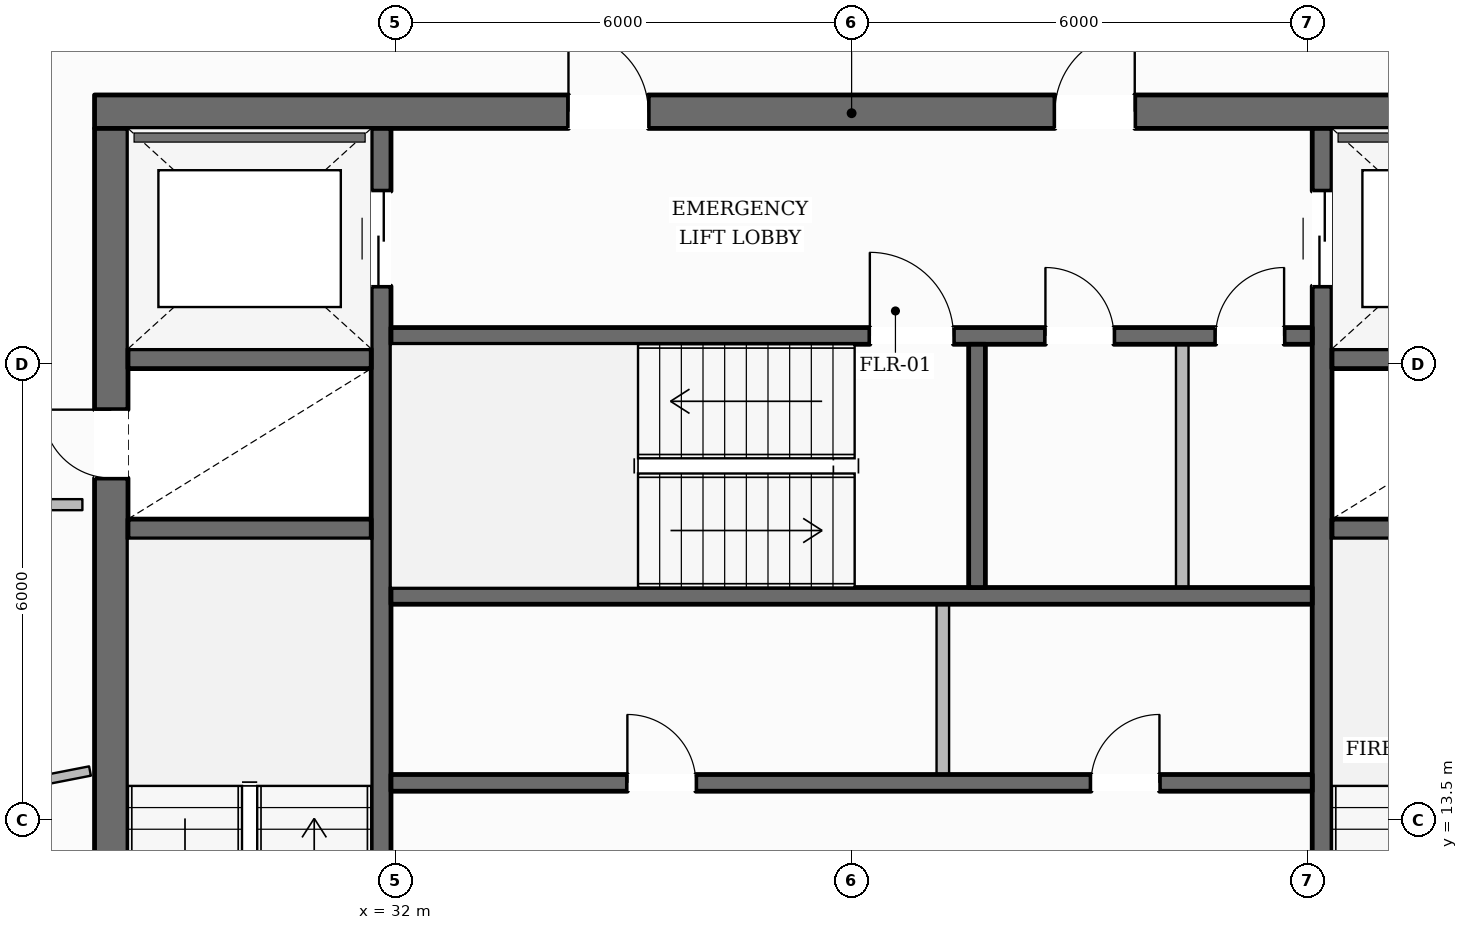
"""IFC4 building model, lengths in metres.
Left out: names, types, materials, properties, quantities, classifications, styles, units other than length and angle.
Written with IfcOpenShell. Run it as: python <this file> out.ifc"""

import sys

from ifc_helpers import new_model, si_unit, direction, frame, frame_2d, origin, place, context, subcontext, project, spatial, rectangle, extrude, element, fill, save


model = new_model("IFC4")
c1 = context("Model", 3, precision=1e-05, world=origin(), true_north=direction((0.0, 1.0)))
c2 = subcontext(c1, "Body", "Model", "MODEL_VIEW")
j1 = project(units=[si_unit("LENGTHUNIT", "METRE"), si_unit("PLANEANGLEUNIT", "RADIAN")], contexts=[c1])
p1 = place(None, origin())
s1 = spatial("IfcSite", under=j1, at=p1, CompositionType="ELEMENT")
p2 = place(p1, origin())
s2 = spatial("IfcBuilding", under=s1, at=p2, CompositionType="ELEMENT")
p3 = place(p2, frame((0.0, 0.0, 199.65)))
s3 = spatial("IfcBuildingStorey", under=s2, at=p3, CompositionType="ELEMENT", Elevation=199.65)
p4 = place(p3, frame((28.04, 22.82, 0.0), z_axis=(0.0, 0.0, 1.0), x_axis=(1.0, 0.0, 0.0)))
e1 = element("IfcWall", 1, at=p4, inside=s3, PredefinedType="SOLIDWALL", context=c2, shape_type="SweptSolid", body=[
    extrude(rectangle(XDim=19.92, YDim=0.44, at=frame_2d((9.96, 0.0))), origin(), (0.0, 0.0, 1.0), 3.6),
])
p5 = place(p4, frame((6.235, 0.0, 0.0)))
e2 = element("IfcOpeningElement", 2, at=p5, cuts=e1, PredefinedType="OPENING", context=c2, shape_type="SweptSolid", body=[
    extrude(rectangle(XDim=1.05, YDim=2.15, at=frame_2d((0.525, 1.075))), frame((0.0, 0.23, 0.0), z_axis=(0.0, -1.0, 0.0), x_axis=(1.0, 0.0, 0.0)), (0.0, 0.0, 1.0), 0.46),
])
p6 = place(p4, frame((12.635, 0.0, 0.0)))
e3 = element("IfcOpeningElement", 3, at=p6, cuts=e1, PredefinedType="OPENING", context=c2, shape_type="SweptSolid", body=[
    extrude(rectangle(XDim=1.05, YDim=2.15, at=frame_2d((0.525, 1.075))), frame((0.0, 0.23, 0.0), z_axis=(0.0, -1.0, 0.0), x_axis=(1.0, 0.0, 0.0)), (0.0, 0.0, 1.0), 0.46),
])
p7 = place(p3, frame((28.26, 9.6, 0.0), z_axis=(0.0, 0.0, 1.0), x_axis=(0.0, 1.0, 0.0)))
e4 = element("IfcWall", 4, at=p7, inside=s3, PredefinedType="SOLIDWALL", context=c2, shape_type="SweptSolid", body=[
    extrude(rectangle(XDim=13.0, YDim=0.44, at=frame_2d((6.5, 0.0))), origin(), (0.0, 0.0, 1.0), 3.6),
])
p8 = place(p7, frame((0.2, 0.0, 0.0)))
e5 = element("IfcOpeningElement", 5, at=p8, cuts=e4, PredefinedType="OPENING", context=c2, shape_type="SweptSolid", body=[
    extrude(rectangle(XDim=1.1, YDim=2.15, at=frame_2d((0.55, 1.075))), frame((0.0, 0.23, 0.0), z_axis=(0.0, -1.0, 0.0), x_axis=(1.0, 0.0, 0.0)), (0.0, 0.0, 1.0), 0.46),
])
p9 = place(p7, frame((8.4, 0.0, 0.0)))
e6 = element("IfcOpeningElement", 6, at=p9, cuts=e4, PredefinedType="OPENING", context=c2, shape_type="SweptSolid", body=[
    extrude(rectangle(XDim=0.9, YDim=2.1, at=frame_2d((0.45, 1.05))), frame((0.0, 0.23, 0.0), z_axis=(0.0, -1.0, 0.0), x_axis=(1.0, 0.0, 0.0)), (0.0, 0.0, 1.0), 0.46),
])
p10 = place(p3, frame((31.81, 9.6, 0.0), z_axis=(0.0, 0.0, 1.0), x_axis=(0.0, 1.0, 0.0)))
e7 = element("IfcWall", 7, at=p10, inside=s3, PredefinedType="SHEAR", context=c2, shape_type="SweptSolid", body=[
    extrude(rectangle(XDim=13.0, YDim=0.26, at=frame_2d((6.5, 0.0))), origin(), (0.0, 0.0, 1.0), 3.6),
])
p11 = place(p10, frame((10.925, 0.0, 0.0)))
e8 = element("IfcOpeningElement", 8, at=p11, cuts=e7, PredefinedType="OPENING", context=c2, shape_type="SweptSolid", body=[
    extrude(rectangle(XDim=1.25, YDim=2.25, at=frame_2d((0.625, 1.125))), frame((0.0, 0.14, 0.0), z_axis=(0.0, -1.0, 0.0), x_axis=(1.0, 0.0, 0.0)), (0.0, 0.0, 1.0), 0.28),
])
p12 = place(p3, frame((44.19, 9.6, 0.0), z_axis=(0.0, 0.0, 1.0), x_axis=(0.0, 1.0, 0.0)))
e9 = element("IfcWall", 9, at=p12, inside=s3, PredefinedType="SHEAR", context=c2, shape_type="SweptSolid", body=[
    extrude(rectangle(XDim=13.0, YDim=0.26, at=frame_2d((6.5, 0.0))), origin(), (0.0, 0.0, 1.0), 3.6),
])
p13 = place(p12, frame((10.925, 0.0, 0.0)))
e10 = element("IfcOpeningElement", 10, at=p13, cuts=e9, PredefinedType="OPENING", context=c2, shape_type="SweptSolid", body=[
    extrude(rectangle(XDim=1.25, YDim=2.25, at=frame_2d((0.625, 1.125))), frame((0.0, 0.14, 0.0), z_axis=(0.0, -1.0, 0.0), x_axis=(1.0, 0.0, 0.0)), (0.0, 0.0, 1.0), 0.28),
])
for number, where, z_axis, x_axis in (
    (11, (28.48, 17.33, 0.0), (0.0, 0.0, 1.0), (1.0, 0.0, 0.0)),
    (12, (28.48, 19.57, 0.0), (0.0, 0.0, 1.0), (1.0, 0.0, 0.0)),
    (13, (44.32, 17.33, 0.0), (0.0, 0.0, 1.0), (1.0, 0.0, 0.0)),
    (14, (44.32, 19.57, 0.0), (0.0, 0.0, 1.0), (1.0, 0.0, 0.0)),
):
    element("IfcWall", number, at=place(p3, frame(where, z_axis=z_axis, x_axis=x_axis)), inside=s3, PredefinedType="SHEAR", context=c2, shape_type="SweptSolid", body=[
        extrude(rectangle(XDim=3.2, YDim=0.26, at=frame_2d((1.6, 0.0))), origin(), (0.0, 0.0, 1.0), 3.6),
    ])
p14 = place(p3, frame((31.94, 19.87, 0.0), z_axis=(0.0, 0.0, 1.0), x_axis=(1.0, 0.0, 0.0)))
e15 = element("IfcWall", 15, at=p14, inside=s3, PredefinedType="SOLIDWALL", context=c2, shape_type="SweptSolid", body=[
    extrude(rectangle(XDim=12.12, YDim=0.22, at=frame_2d((6.06, 0.0))), origin(), (0.0, 0.0, 1.0), 3.6),
])
p15 = place(p14, frame((6.3, 0.0, 0.0)))
e16 = element("IfcOpeningElement", 16, at=p15, cuts=e15, PredefinedType="OPENING", context=c2, shape_type="SweptSolid", body=[
    extrude(rectangle(XDim=1.1, YDim=2.15, at=frame_2d((0.55, 1.075))), frame((0.0, 0.12, 0.0), z_axis=(0.0, -1.0, 0.0), x_axis=(1.0, 0.0, 0.0)), (0.0, 0.0, 1.0), 0.24),
])
p16 = place(p14, frame((8.61, 0.0, 0.0)))
e17 = element("IfcOpeningElement", 17, at=p16, cuts=e15, PredefinedType="OPENING", context=c2, shape_type="SweptSolid", body=[
    extrude(rectangle(XDim=0.9, YDim=2.1, at=frame_2d((0.45, 1.05))), frame((0.0, 0.12, 0.0), z_axis=(0.0, -1.0, 0.0), x_axis=(1.0, 0.0, 0.0)), (0.0, 0.0, 1.0), 0.24),
])
p17 = place(p14, frame((10.85, 0.0, 0.0)))
e18 = element("IfcOpeningElement", 18, at=p17, cuts=e15, PredefinedType="OPENING", context=c2, shape_type="SweptSolid", body=[
    extrude(rectangle(XDim=0.9, YDim=2.1, at=frame_2d((0.45, 1.05))), frame((0.0, 0.12, 0.0), z_axis=(0.0, -1.0, 0.0), x_axis=(1.0, 0.0, 0.0)), (0.0, 0.0, 1.0), 0.24),
])
p18 = place(p3, frame((31.94, 16.45, 0.0), z_axis=(0.0, 0.0, 1.0), x_axis=(1.0, 0.0, 0.0)))
e19 = element("IfcWall", 19, at=p18, inside=s3, PredefinedType="SOLIDWALL", context=c2, shape_type="SweptSolid", body=[
    extrude(rectangle(XDim=12.12, YDim=0.22, at=frame_2d((6.06, 0.0))), origin(), (0.0, 0.0, 1.0), 3.6),
])
p19 = place(p3, frame((39.65, 16.56, 0.0), z_axis=(0.0, 0.0, 1.0), x_axis=(0.0, 1.0, 0.0)))
e20 = element("IfcWall", 20, at=p19, inside=s3, PredefinedType="SOLIDWALL", context=c2, shape_type="SweptSolid", body=[
    extrude(rectangle(XDim=3.2, YDim=0.22, at=frame_2d((1.6, 0.0))), origin(), (0.0, 0.0, 1.0), 3.6),
])
p20 = place(p3, frame((31.94, 13.99, 0.0), z_axis=(0.0, 0.0, 1.0), x_axis=(1.0, 0.0, 0.0)))
e21 = element("IfcWall", 21, at=p20, inside=s3, PredefinedType="SOLIDWALL", context=c2, shape_type="SweptSolid", body=[
    extrude(rectangle(XDim=12.12, YDim=0.22, at=frame_2d((6.06, 0.0))), origin(), (0.0, 0.0, 1.0), 3.6),
])
p21 = place(p20, frame((3.11, 0.0, 0.0)))
e22 = element("IfcOpeningElement", 22, at=p21, cuts=e21, PredefinedType="OPENING", context=c2, shape_type="SweptSolid", body=[
    extrude(rectangle(XDim=0.9, YDim=2.1, at=frame_2d((0.45, 1.05))), frame((0.0, 0.12, 0.0), z_axis=(0.0, -1.0, 0.0), x_axis=(1.0, 0.0, 0.0)), (0.0, 0.0, 1.0), 0.24),
])
p22 = place(p20, frame((9.21, 0.0, 0.0)))
e23 = element("IfcOpeningElement", 23, at=p22, cuts=e21, PredefinedType="OPENING", context=c2, shape_type="SweptSolid", body=[
    extrude(rectangle(XDim=0.9, YDim=2.1, at=frame_2d((0.45, 1.05))), frame((0.0, 0.12, 0.0), z_axis=(0.0, -1.0, 0.0), x_axis=(1.0, 0.0, 0.0)), (0.0, 0.0, 1.0), 0.24),
])
p23 = place(p3, frame((14.586, 11.347, 0.0), z_axis=(0.0, 0.0, 1.0), x_axis=(0.504997770855, 0.863120647089, 0.0)))
e24 = element("IfcWall", 24, at=p23, inside=s3, PredefinedType="STANDARD", context=c2, shape_type="SweptSolid", body=[
    extrude(rectangle(XDim=37.843, YDim=0.35, at=frame_2d((18.921, 0.0))), origin(), (0.0, 0.0, 1.0), 3.132),
])
p24 = place(p23, frame((9.061, 0.0, 0.0)))
e25 = element("IfcOpeningElement", 25, at=p24, cuts=e24, PredefinedType="OPENING", context=c2, shape_type="SweptSolid", body=[
    extrude(rectangle(XDim=1.0, YDim=2.2, at=frame_2d((0.5, 1.1))), frame((0.0, 0.185, 0.0), z_axis=(0.0, -1.0, 0.0), x_axis=(1.0, 0.0, 0.0)), (0.0, 0.0, 1.0), 0.37),
])
p25 = place(p23, frame((33.567, 0.0, 0.65)))
e26 = element("IfcOpeningElement", 26, at=p25, cuts=e24, PredefinedType="OPENING", context=c2, shape_type="SweptSolid", body=[
    extrude(rectangle(XDim=1.45, YDim=1.75, at=frame_2d((0.725, 0.875))), frame((0.0, 0.185, 0.0), z_axis=(0.0, -1.0, 0.0), x_axis=(1.0, 0.0, 0.0)), (0.0, 0.0, 1.0), 0.37),
])
p26 = place(p23, frame((27.42, 0.0, 0.65)))
e27 = element("IfcOpeningElement", 27, at=p26, cuts=e24, PredefinedType="OPENING", context=c2, shape_type="SweptSolid", body=[
    extrude(rectangle(XDim=1.45, YDim=1.75, at=frame_2d((0.725, 0.875))), frame((0.0, 0.185, 0.0), z_axis=(0.0, -1.0, 0.0), x_axis=(1.0, 0.0, 0.0)), (0.0, 0.0, 1.0), 0.37),
])
p27 = place(p23, frame((21.273, 0.0, 0.65)))
e28 = element("IfcOpeningElement", 28, at=p27, cuts=e24, PredefinedType="OPENING", context=c2, shape_type="SweptSolid", body=[
    extrude(rectangle(XDim=1.45, YDim=1.75, at=frame_2d((0.725, 0.875))), frame((0.0, 0.185, 0.0), z_axis=(0.0, -1.0, 0.0), x_axis=(1.0, 0.0, 0.0)), (0.0, 0.0, 1.0), 0.37),
])
p28 = place(p23, frame((2.831, 0.0, 0.65)))
e29 = element("IfcOpeningElement", 29, at=p28, cuts=e24, PredefinedType="OPENING", context=c2, shape_type="SweptSolid", body=[
    extrude(rectangle(XDim=1.45, YDim=1.75, at=frame_2d((0.725, 0.875))), frame((0.0, 0.185, 0.0), z_axis=(0.0, -1.0, 0.0), x_axis=(1.0, 0.0, 0.0)), (0.0, 0.0, 1.0), 0.37),
])
p29 = place(p3, frame((42.36, 43.976, 0.0), z_axis=(0.0, 0.0, 1.0), x_axis=(0.508076618563, -0.861311877121, 0.0)))
e30 = element("IfcWall", 30, at=p29, inside=s3, PredefinedType="STANDARD", context=c2, shape_type="SweptSolid", body=[
    extrude(rectangle(XDim=38.079, YDim=0.35, at=frame_2d((19.04, 0.0))), origin(), (0.0, 0.0, 1.0), 3.132),
])
p30 = place(p29, frame((9.12, 0.0, 0.0)))
e31 = element("IfcOpeningElement", 31, at=p30, cuts=e30, PredefinedType="OPENING", context=c2, shape_type="SweptSolid", body=[
    extrude(rectangle(XDim=1.0, YDim=2.2, at=frame_2d((0.5, 1.1))), frame((0.0, 0.185, 0.0), z_axis=(0.0, -1.0, 0.0), x_axis=(1.0, 0.0, 0.0)), (0.0, 0.0, 1.0), 0.37),
])
p31 = place(p29, frame((33.779, 0.0, 0.65)))
e32 = element("IfcOpeningElement", 32, at=p31, cuts=e30, PredefinedType="OPENING", context=c2, shape_type="SweptSolid", body=[
    extrude(rectangle(XDim=1.45, YDim=1.75, at=frame_2d((0.725, 0.875))), frame((0.0, 0.185, 0.0), z_axis=(0.0, -1.0, 0.0), x_axis=(1.0, 0.0, 0.0)), (0.0, 0.0, 1.0), 0.37),
])
p32 = place(p29, frame((27.591, 0.0, 0.65)))
e33 = element("IfcOpeningElement", 33, at=p32, cuts=e30, PredefinedType="OPENING", context=c2, shape_type="SweptSolid", body=[
    extrude(rectangle(XDim=1.45, YDim=1.75, at=frame_2d((0.725, 0.875))), frame((0.0, 0.185, 0.0), z_axis=(0.0, -1.0, 0.0), x_axis=(1.0, 0.0, 0.0)), (0.0, 0.0, 1.0), 0.37),
])
p33 = place(p29, frame((21.404, 0.0, 0.65)))
e34 = element("IfcOpeningElement", 34, at=p33, cuts=e30, PredefinedType="OPENING", context=c2, shape_type="SweptSolid", body=[
    extrude(rectangle(XDim=1.45, YDim=1.75, at=frame_2d((0.725, 0.875))), frame((0.0, 0.185, 0.0), z_axis=(0.0, -1.0, 0.0), x_axis=(1.0, 0.0, 0.0)), (0.0, 0.0, 1.0), 0.37),
])
p34 = place(p29, frame((2.842, 0.0, 0.65)))
e35 = element("IfcOpeningElement", 35, at=p34, cuts=e30, PredefinedType="OPENING", context=c2, shape_type="SweptSolid", body=[
    extrude(rectangle(XDim=1.45, YDim=1.75, at=frame_2d((0.725, 0.875))), frame((0.0, 0.185, 0.0), z_axis=(0.0, -1.0, 0.0), x_axis=(1.0, 0.0, 0.0)), (0.0, 0.0, 1.0), 0.37),
])
p35 = place(p3, frame((39.2, 14.1, 0.0), z_axis=(0.0, 0.0, 1.0), x_axis=(0.0, 1.0, 0.0)))
e36 = element("IfcWall", 36, at=p35, inside=s3, PredefinedType="PARTITIONING", context=c2, shape_type="SweptSolid", body=[
    extrude(rectangle(XDim=2.24, YDim=0.165, at=frame_2d((1.12, 0.0))), origin(), (0.0, 0.0, 1.0), 3.6),
])
p36 = place(p3, frame((42.35, 16.56, 0.0), z_axis=(0.0, 0.0, 1.0), x_axis=(0.0, 1.0, 0.0)))
e37 = element("IfcWall", 37, at=p36, inside=s3, PredefinedType="PARTITIONING", context=c2, shape_type="SweptSolid", body=[
    extrude(rectangle(XDim=3.2, YDim=0.165, at=frame_2d((1.6, 0.0))), origin(), (0.0, 0.0, 1.0), 3.6),
])
p37 = place(p3, frame((27.88, 17.65, 0.0), z_axis=(0.0, 0.0, 1.0), x_axis=(-1.0, 0.0, 0.0)))
e38 = element("IfcWall", 38, at=p37, inside=s3, PredefinedType="PARTITIONING", context=c2, shape_type="SweptSolid", body=[
    extrude(rectangle(XDim=1.82, YDim=0.145, at=frame_2d((0.91, 0.0))), origin(), (0.0, 0.0, 1.0), 3.6),
])
p38 = place(p3, frame((27.98, 14.146, 0.0), z_axis=(0.0, 0.0, 1.0), x_axis=(-0.981510799249, -0.191406768317, 0.0)))
e39 = element("IfcWall", 39, at=p38, inside=s3, PredefinedType="PARTITIONING", context=c2, shape_type="SweptSolid", body=[
    extrude(rectangle(XDim=12.847, YDim=0.125, at=frame_2d((6.423, 0.0))), origin(), (0.0, 0.0, 1.0), 3.141),
])
p39 = place(p15, origin())
e40 = element("IfcDoor", 40, at=p39, inside=s3, OperationType="SINGLE_SWING_LEFT", PredefinedType="DOOR", context=c2, shape_type="SweptSolid", body=[
    extrude(rectangle(XDim=1.1, YDim=2.15, at=frame_2d((0.55, 1.075))), frame((0.0, 0.025, 0.0), z_axis=(0.0, -1.0, 0.0), x_axis=(1.0, 0.0, 0.0)), (0.0, 0.0, 1.0), 0.05),
])
fill(e16, e40)
p40 = place(p9, origin())
e41 = element("IfcDoor", 41, at=p40, inside=s3, OperationType="SINGLE_SWING_RIGHT", PredefinedType="DOOR", context=c2, shape_type="SweptSolid", body=[
    extrude(rectangle(XDim=0.9, YDim=2.1, at=frame_2d((0.45, 1.05))), frame((0.0, 0.025, 0.0), z_axis=(0.0, -1.0, 0.0), x_axis=(1.0, 0.0, 0.0)), (0.0, 0.0, 1.0), 0.05),
])
fill(e6, e41)
p41 = place(p5, origin())
e42 = element("IfcDoor", 42, at=p41, inside=s3, OperationType="SINGLE_SWING_LEFT", PredefinedType="DOOR", context=c2, shape_type="SweptSolid", body=[
    extrude(rectangle(XDim=1.05, YDim=2.15, at=frame_2d((0.525, 1.075))), frame((0.0, 0.025, 0.0), z_axis=(0.0, -1.0, 0.0), x_axis=(1.0, 0.0, 0.0)), (0.0, 0.0, 1.0), 0.05),
])
fill(e2, e42)
p42 = place(p6, origin())
e43 = element("IfcDoor", 43, at=p42, inside=s3, OperationType="SINGLE_SWING_RIGHT", PredefinedType="DOOR", context=c2, shape_type="SweptSolid", body=[
    extrude(rectangle(XDim=1.05, YDim=2.15, at=frame_2d((0.525, 1.075))), frame((0.0, 0.025, 0.0), z_axis=(0.0, -1.0, 0.0), x_axis=(1.0, 0.0, 0.0)), (0.0, 0.0, 1.0), 0.05),
])
fill(e3, e43)
p43 = place(p11, origin())
e44 = element("IfcDoor", 44, at=p43, inside=s3, OperationType="DOUBLE_DOOR_SLIDING", PredefinedType="DOOR", context=c2, shape_type="SweptSolid", body=[
    extrude(rectangle(XDim=1.25, YDim=2.25, at=frame_2d((0.625, 1.125))), frame((0.0, 0.025, 0.0), z_axis=(0.0, -1.0, 0.0), x_axis=(1.0, 0.0, 0.0)), (0.0, 0.0, 1.0), 0.05),
])
fill(e8, e44)
p44 = place(p13, origin())
e45 = element("IfcDoor", 45, at=p44, inside=s3, OperationType="DOUBLE_DOOR_SLIDING", PredefinedType="DOOR", context=c2, shape_type="SweptSolid", body=[
    extrude(rectangle(XDim=1.25, YDim=2.25, at=frame_2d((0.625, 1.125))), frame((0.0, 0.025, 0.0), z_axis=(0.0, -1.0, 0.0), x_axis=(1.0, 0.0, 0.0)), (0.0, 0.0, 1.0), 0.05),
])
fill(e10, e45)
p45 = place(p21, origin())
e46 = element("IfcDoor", 46, at=p45, inside=s3, OperationType="SINGLE_SWING_LEFT", PredefinedType="DOOR", context=c2, shape_type="SweptSolid", body=[
    extrude(rectangle(XDim=0.9, YDim=2.1, at=frame_2d((0.45, 1.05))), frame((0.0, 0.025, 0.0), z_axis=(0.0, -1.0, 0.0), x_axis=(1.0, 0.0, 0.0)), (0.0, 0.0, 1.0), 0.05),
])
fill(e22, e46)
p46 = place(p22, origin())
e47 = element("IfcDoor", 47, at=p46, inside=s3, OperationType="SINGLE_SWING_RIGHT", PredefinedType="DOOR", context=c2, shape_type="SweptSolid", body=[
    extrude(rectangle(XDim=0.9, YDim=2.1, at=frame_2d((0.45, 1.05))), frame((0.0, 0.025, 0.0), z_axis=(0.0, -1.0, 0.0), x_axis=(1.0, 0.0, 0.0)), (0.0, 0.0, 1.0), 0.05),
])
fill(e23, e47)
p47 = place(p16, origin())
e48 = element("IfcDoor", 48, at=p47, inside=s3, OperationType="SINGLE_SWING_LEFT", PredefinedType="DOOR", context=c2, shape_type="SweptSolid", body=[
    extrude(rectangle(XDim=0.9, YDim=2.1, at=frame_2d((0.45, 1.05))), frame((0.0, 0.025, 0.0), z_axis=(0.0, -1.0, 0.0), x_axis=(1.0, 0.0, 0.0)), (0.0, 0.0, 1.0), 0.05),
])
fill(e17, e48)
p48 = place(p17, origin())
e49 = element("IfcDoor", 49, at=p48, inside=s3, OperationType="SINGLE_SWING_RIGHT", PredefinedType="DOOR", context=c2, shape_type="SweptSolid", body=[
    extrude(rectangle(XDim=0.9, YDim=2.1, at=frame_2d((0.45, 1.05))), frame((0.0, 0.025, 0.0), z_axis=(0.0, -1.0, 0.0), x_axis=(1.0, 0.0, 0.0)), (0.0, 0.0, 1.0), 0.05),
])
fill(e18, e49)
save(model, sys.argv[1])
